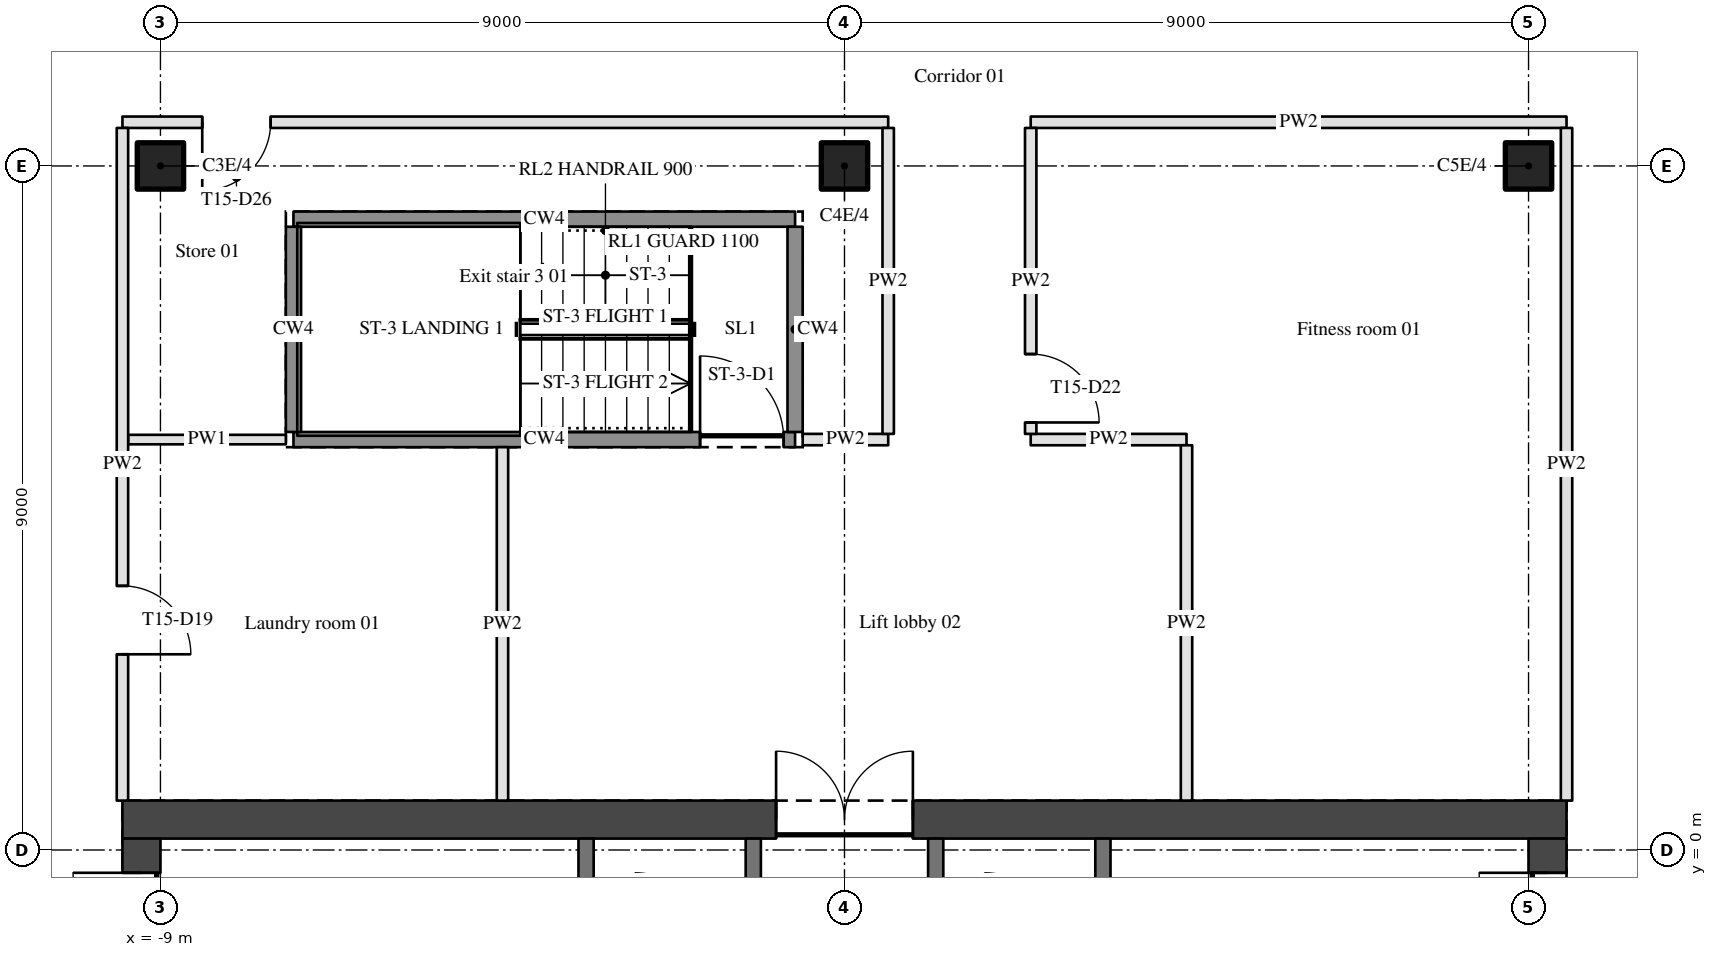
"""IFC4 building model, lengths in metres.
Left out: names, types, materials, properties, quantities, classifications, styles, units other than length and angle.
Written with IfcOpenShell. Run it as: python <this file> out.ifc"""

import sys

from ifc_helpers import new_model, si_unit, direction, frame, frame_2d, origin, origin_2d, place, context, subcontext, project, spatial, rectangle, hollow_circle, extrude, element, fill, save


model = new_model("IFC4")
c1 = context("Model", 3, precision=1e-05, world=origin(), true_north=direction((0.0, 1.0)))
c2 = subcontext(c1, "Body", "Model", "MODEL_VIEW")
j1 = project(units=[si_unit("LENGTHUNIT", "METRE"), si_unit("PLANEANGLEUNIT", "RADIAN")], contexts=[c1])
p1 = place(None, origin())
s1 = spatial("IfcSite", under=j1, at=p1, CompositionType="ELEMENT")
p2 = place(p1, origin())
s2 = spatial("IfcBuilding", under=s1, at=p2, CompositionType="ELEMENT")
p3 = place(p2, frame((0.0, 0.0, 206.85)))
s3 = spatial("IfcBuildingStorey", under=s2, at=p3, CompositionType="ELEMENT", Elevation=206.85)
for number, where, z_axis, x_axis in (
    (1, (-9.0, 9.0, 0.0), (0.0, 0.0, 1.0), (1.0, 0.0, 0.0)),
    (2, (0.0, 9.0, 0.0), (0.0, 0.0, 1.0), (1.0, 0.0, 0.0)),
    (3, (9.0, 9.0, 0.0), (0.0, 0.0, 1.0), (1.0, 0.0, 0.0)),
):
    element("IfcColumn", number, at=place(p3, frame(where, z_axis=z_axis, x_axis=x_axis)), inside=s3, PredefinedType="COLUMN", context=c2, shape_type="SweptSolid", body=[
        extrude(hollow_circle(Radius=0.305, WallThickness=0.03, at=origin_2d()), origin(), (0.0, 0.0, 1.0), 3.15),
    ])
p4 = place(p3, frame((-9.5, 0.4, 0.0), z_axis=(0.0, 0.0, 1.0), x_axis=(1.0, 0.0, 0.0)))
e4 = element("IfcWall", 4, at=p4, inside=s3, PredefinedType="SHEAR", context=c2, shape_type="SweptSolid", body=[
    extrude(rectangle(XDim=19.0, YDim=0.5, at=frame_2d((9.5, 0.0))), origin(), (0.0, 0.0, 1.0), 3.15),
])
p5 = place(p4, frame((8.6, 0.0, 0.0)))
e5 = element("IfcOpeningElement", 5, at=p5, cuts=e4, PredefinedType="OPENING", context=c2, shape_type="SweptSolid", body=[
    extrude(rectangle(XDim=1.8, YDim=2.1, at=frame_2d((0.9, 1.05))), frame((0.0, 0.26, 0.0), z_axis=(0.0, -1.0, 0.0), x_axis=(1.0, 0.0, 0.0)), (0.0, 0.0, 1.0), 0.52),
])
p6 = place(p3, frame((-9.25, -11.5, 0.0), z_axis=(0.0, 0.0, 1.0), x_axis=(0.0, 1.0, 0.0)))
e6 = element("IfcWall", 6, at=p6, inside=s3, PredefinedType="SHEAR", context=c2, shape_type="SweptSolid", body=[
    extrude(rectangle(XDim=11.65, YDim=0.5, at=frame_2d((5.825, 0.0))), origin(), (0.0, 0.0, 1.0), 3.15),
])
p7 = place(p6, frame((9.4, 0.0, 0.0)))
e7 = element("IfcOpeningElement", 7, at=p7, cuts=e6, PredefinedType="OPENING", context=c2, shape_type="SweptSolid", body=[
    extrude(rectangle(XDim=1.8, YDim=2.1, at=frame_2d((0.9, 1.05))), frame((0.0, 0.26, 0.0), z_axis=(0.0, -1.0, 0.0), x_axis=(1.0, 0.0, 0.0)), (0.0, 0.0, 1.0), 0.52),
])
p8 = place(p3, frame((9.25, -11.5, 0.0), z_axis=(0.0, 0.0, 1.0), x_axis=(0.0, 1.0, 0.0)))
e8 = element("IfcWall", 8, at=p8, inside=s3, PredefinedType="SHEAR", context=c2, shape_type="SweptSolid", body=[
    extrude(rectangle(XDim=11.65, YDim=0.5, at=frame_2d((5.825, 0.0))), origin(), (0.0, 0.0, 1.0), 3.15),
])
p9 = place(p8, frame((9.4, 0.0, 0.0)))
e9 = element("IfcOpeningElement", 9, at=p9, cuts=e8, PredefinedType="OPENING", context=c2, shape_type="SweptSolid", body=[
    extrude(rectangle(XDim=1.8, YDim=2.1, at=frame_2d((0.9, 1.05))), frame((0.0, 0.26, 0.0), z_axis=(0.0, -1.0, 0.0), x_axis=(1.0, 0.0, 0.0)), (0.0, 0.0, 1.0), 0.52),
])
p10 = place(p3, frame((-9.425, 5.4, 0.0), z_axis=(0.0, 0.0, 1.0), x_axis=(1.0, 0.0, 0.0)))
e10 = element("IfcWall", 10, at=p10, inside=s3, PredefinedType="PARTITIONING", context=c2, shape_type="SweptSolid", body=[
    extrude(rectangle(XDim=2.075, YDim=0.125, at=frame_2d((1.038, 0.0))), origin(), (0.0, 0.0, 1.0), 2.21),
])
p11 = place(p3, frame((-7.25, 5.4, 0.0), z_axis=(0.0, 0.0, 1.0), x_axis=(1.0, 0.0, 0.0)))
e11 = element("IfcWall", 11, at=p11, inside=s3, PredefinedType="SHEAR", context=c2, shape_type="SweptSolid", body=[
    extrude(rectangle(XDim=6.6, YDim=0.2, at=frame_2d((3.3, 0.0))), origin(), (0.0, 0.0, 1.0), 3.15),
])
p12 = place(p11, frame((5.35, 0.0, 0.0)))
e12 = element("IfcOpeningElement", 12, at=p12, cuts=e11, PredefinedType="OPENING", context=c2, shape_type="SweptSolid", body=[
    extrude(rectangle(XDim=1.1, YDim=2.1, at=frame_2d((0.55, 1.05))), frame((0.0, 0.11, 0.0), z_axis=(0.0, -1.0, 0.0), x_axis=(1.0, 0.0, 0.0)), (0.0, 0.0, 1.0), 0.22),
])
p13 = place(p3, frame((-0.55, 5.4, 0.0), z_axis=(0.0, 0.0, 1.0), x_axis=(1.0, 0.0, 0.0)))
e13 = element("IfcWall", 13, at=p13, inside=s3, PredefinedType="PARTITIONING", context=c2, shape_type="SweptSolid", body=[
    extrude(rectangle(XDim=1.125, YDim=0.15, at=frame_2d((0.562, 0.0))), origin(), (0.0, 0.0, 1.0), 2.21),
])
p14 = place(p3, frame((2.45, 5.4, 0.0), z_axis=(0.0, 0.0, 1.0), x_axis=(1.0, 0.0, 0.0)))
e14 = element("IfcWall", 14, at=p14, inside=s3, PredefinedType="PARTITIONING", context=c2, shape_type="SweptSolid", body=[
    extrude(rectangle(XDim=2.05, YDim=0.15, at=frame_2d((1.025, 0.0))), origin(), (0.0, 0.0, 1.0), 2.21),
])
p15 = place(p3, frame((-7.25, 8.3, 0.0), z_axis=(0.0, 0.0, 1.0), x_axis=(1.0, 0.0, 0.0)))
e15 = element("IfcWall", 15, at=p15, inside=s3, PredefinedType="SHEAR", context=c2, shape_type="SweptSolid", body=[
    extrude(rectangle(XDim=6.6, YDim=0.2, at=frame_2d((3.3, 0.0))), origin(), (0.0, 0.0, 1.0), 3.15),
])
p16 = place(p3, frame((0.575, 9.575, 0.0), z_axis=(0.0, 0.0, 1.0), x_axis=(-1.0, 0.0, 0.0)))
e16 = element("IfcWall", 16, at=p16, inside=s3, PredefinedType="PARTITIONING", context=c2, shape_type="SweptSolid", body=[
    extrude(rectangle(XDim=10.075, YDim=0.15, at=frame_2d((5.038, 0.0))), origin(), (0.0, 0.0, 1.0), 2.21),
])
p17 = place(p16, frame((8.125, 0.0, 0.0)))
e17 = element("IfcOpeningElement", 17, at=p17, cuts=e16, PredefinedType="OPENING", context=c2, shape_type="SweptSolid", body=[
    extrude(rectangle(XDim=0.9, YDim=2.1, at=frame_2d((0.45, 1.05))), frame((0.0, 0.085, 0.0), z_axis=(0.0, -1.0, 0.0), x_axis=(1.0, 0.0, 0.0)), (0.0, 0.0, 1.0), 0.17),
])
p18 = place(p3, frame((2.45, 9.575, 0.0), z_axis=(0.0, 0.0, 1.0), x_axis=(1.0, 0.0, 0.0)))
e18 = element("IfcWall", 18, at=p18, inside=s3, PredefinedType="PARTITIONING", context=c2, shape_type="SweptSolid", body=[
    extrude(rectangle(XDim=7.05, YDim=0.15, at=frame_2d((3.525, 0.0))), origin(), (0.0, 0.0, 1.0), 2.21),
])
p19 = place(p3, frame((-9.5, 9.5, 0.0), z_axis=(0.0, 0.0, 1.0), x_axis=(0.0, -1.0, 0.0)))
e19 = element("IfcWall", 19, at=p19, inside=s3, PredefinedType="PARTITIONING", context=c2, shape_type="SweptSolid", body=[
    extrude(rectangle(XDim=8.85, YDim=0.15, at=frame_2d((4.425, 0.0))), origin(), (0.0, 0.0, 1.0), 2.21),
])
p20 = place(p19, frame((6.025, 0.0, 0.0)))
e20 = element("IfcOpeningElement", 20, at=p20, cuts=e19, PredefinedType="OPENING", context=c2, shape_type="SweptSolid", body=[
    extrude(rectangle(XDim=0.9, YDim=2.1, at=frame_2d((0.45, 1.05))), frame((0.0, 0.085, 0.0), z_axis=(0.0, -1.0, 0.0), x_axis=(1.0, 0.0, 0.0)), (0.0, 0.0, 1.0), 0.17),
])
p21 = place(p3, frame((-7.25, 5.5, 0.0), z_axis=(0.0, 0.0, 1.0), x_axis=(0.0, 1.0, 0.0)))
e21 = element("IfcWall", 21, at=p21, inside=s3, PredefinedType="SHEAR", context=c2, shape_type="SweptSolid", body=[
    extrude(rectangle(XDim=2.7, YDim=0.2, at=frame_2d((1.35, 0.0))), origin(), (0.0, 0.0, 1.0), 3.15),
])
p22 = place(p3, frame((-4.5, 0.65, 0.0), z_axis=(0.0, 0.0, 1.0), x_axis=(0.0, 1.0, 0.0)))
e22 = element("IfcWall", 22, at=p22, inside=s3, PredefinedType="PARTITIONING", context=c2, shape_type="SweptSolid", body=[
    extrude(rectangle(XDim=4.65, YDim=0.15, at=frame_2d((2.325, 0.0))), origin(), (0.0, 0.0, 1.0), 2.21),
])
for number, where, z_axis, x_axis in (
    (23, (-3.4, -1.1, 0.0), (0.0, 0.0, 1.0), (0.0, 1.0, 0.0)),
    (24, (-1.2, -1.1, 0.0), (0.0, 0.0, 1.0), (0.0, 1.0, 0.0)),
):
    element("IfcWall", number, at=place(p3, frame(where, z_axis=z_axis, x_axis=x_axis)), inside=s3, PredefinedType="SOLIDWALL", context=c2, shape_type="SweptSolid", body=[
        extrude(rectangle(XDim=1.25, YDim=0.2, at=frame_2d((0.625, 0.0))), origin(), (0.0, 0.0, 1.0), 2.85),
    ])
p23 = place(p3, frame((-0.65, 5.5, 0.0), z_axis=(0.0, 0.0, 1.0), x_axis=(0.0, 1.0, 0.0)))
e25 = element("IfcWall", 25, at=p23, inside=s3, PredefinedType="SHEAR", context=c2, shape_type="SweptSolid", body=[
    extrude(rectangle(XDim=2.7, YDim=0.2, at=frame_2d((1.35, 0.0))), origin(), (0.0, 0.0, 1.0), 3.15),
])
p24 = place(p3, frame((0.575, 5.475, 0.0), z_axis=(0.0, 0.0, 1.0), x_axis=(0.0, 1.0, 0.0)))
e26 = element("IfcWall", 26, at=p24, inside=s3, PredefinedType="PARTITIONING", context=c2, shape_type="SweptSolid", body=[
    extrude(rectangle(XDim=4.025, YDim=0.15, at=frame_2d((2.012, 0.0))), origin(), (0.0, 0.0, 1.0), 2.21),
])
p25 = place(p3, frame((1.2, -1.1, 0.0), z_axis=(0.0, 0.0, 1.0), x_axis=(0.0, 1.0, 0.0)))
e27 = element("IfcWall", 27, at=p25, inside=s3, PredefinedType="SOLIDWALL", context=c2, shape_type="SweptSolid", body=[
    extrude(rectangle(XDim=1.25, YDim=0.2, at=frame_2d((0.625, 0.0))), origin(), (0.0, 0.0, 1.0), 2.85),
])
p26 = place(p3, frame((2.45, 9.5, 0.0), z_axis=(0.0, 0.0, 1.0), x_axis=(0.0, -1.0, 0.0)))
e28 = element("IfcWall", 28, at=p26, inside=s3, PredefinedType="PARTITIONING", context=c2, shape_type="SweptSolid", body=[
    extrude(rectangle(XDim=4.025, YDim=0.15, at=frame_2d((2.012, 0.0))), origin(), (0.0, 0.0, 1.0), 2.21),
])
p27 = place(p26, frame((2.975, 0.0, 0.0)))
e29 = element("IfcOpeningElement", 29, at=p27, cuts=e28, PredefinedType="OPENING", context=c2, shape_type="SweptSolid", body=[
    extrude(rectangle(XDim=0.9, YDim=2.1, at=frame_2d((0.45, 1.05))), frame((0.0, 0.085, 0.0), z_axis=(0.0, -1.0, 0.0), x_axis=(1.0, 0.0, 0.0)), (0.0, 0.0, 1.0), 0.17),
])
p28 = place(p3, frame((3.4, -1.1, 0.0), z_axis=(0.0, 0.0, 1.0), x_axis=(0.0, 1.0, 0.0)))
e30 = element("IfcWall", 30, at=p28, inside=s3, PredefinedType="SOLIDWALL", context=c2, shape_type="SweptSolid", body=[
    extrude(rectangle(XDim=1.25, YDim=0.2, at=frame_2d((0.625, 0.0))), origin(), (0.0, 0.0, 1.0), 2.85),
])
p29 = place(p3, frame((4.5, 0.65, 0.0), z_axis=(0.0, 0.0, 1.0), x_axis=(0.0, 1.0, 0.0)))
e31 = element("IfcWall", 31, at=p29, inside=s3, PredefinedType="PARTITIONING", context=c2, shape_type="SweptSolid", body=[
    extrude(rectangle(XDim=4.675, YDim=0.15, at=frame_2d((2.337, 0.0))), origin(), (0.0, 0.0, 1.0), 2.21),
])
p30 = place(p3, frame((9.5, 0.65, 0.0), z_axis=(0.0, 0.0, 1.0), x_axis=(0.0, 1.0, 0.0)))
e32 = element("IfcWall", 32, at=p30, inside=s3, PredefinedType="PARTITIONING", context=c2, shape_type="SweptSolid", body=[
    extrude(rectangle(XDim=8.85, YDim=0.15, at=frame_2d((4.425, 0.0))), origin(), (0.0, 0.0, 1.0), 2.21),
])
p31 = place(p7, origin())
e33 = element("IfcDoor", 33, at=p31, inside=s3, OperationType="DOUBLE_DOOR_SINGLE_SWING", PredefinedType="DOOR", context=c2, shape_type="SweptSolid", body=[
    extrude(rectangle(XDim=1.8, YDim=2.1, at=frame_2d((0.9, 1.05))), frame((0.0, 0.025, 0.0), z_axis=(0.0, -1.0, 0.0), x_axis=(1.0, 0.0, 0.0)), (0.0, 0.0, 1.0), 0.05),
])
fill(e7, e33)
p32 = place(p9, origin())
e34 = element("IfcDoor", 34, at=p32, inside=s3, OperationType="DOUBLE_DOOR_SINGLE_SWING", PredefinedType="DOOR", context=c2, shape_type="SweptSolid", body=[
    extrude(rectangle(XDim=1.8, YDim=2.1, at=frame_2d((0.9, 1.05))), frame((0.0, 0.025, 0.0), z_axis=(0.0, -1.0, 0.0), x_axis=(1.0, 0.0, 0.0)), (0.0, 0.0, 1.0), 0.05),
])
fill(e9, e34)
p33 = place(p5, origin())
e35 = element("IfcDoor", 35, at=p33, inside=s3, OperationType="DOUBLE_DOOR_SINGLE_SWING", PredefinedType="DOOR", context=c2, shape_type="SweptSolid", body=[
    extrude(rectangle(XDim=1.8, YDim=2.1, at=frame_2d((0.9, 1.05))), frame((0.0, 0.025, 0.0), z_axis=(0.0, -1.0, 0.0), x_axis=(1.0, 0.0, 0.0)), (0.0, 0.0, 1.0), 0.05),
])
fill(e5, e35)
p34 = place(p12, origin())
e36 = element("IfcDoor", 36, at=p34, inside=s3, OperationType="SINGLE_SWING_LEFT", PredefinedType="DOOR", context=c2, shape_type="SweptSolid", body=[
    extrude(rectangle(XDim=1.1, YDim=2.1, at=frame_2d((0.55, 1.05))), frame((0.0, 0.025, 0.0), z_axis=(0.0, -1.0, 0.0), x_axis=(1.0, 0.0, 0.0)), (0.0, 0.0, 1.0), 0.05),
])
fill(e12, e36)
p35 = place(p27, origin())
e37 = element("IfcDoor", 37, at=p35, inside=s3, OperationType="SINGLE_SWING_RIGHT", PredefinedType="DOOR", context=c2, shape_type="SweptSolid", body=[
    extrude(rectangle(XDim=0.9, YDim=2.1, at=frame_2d((0.45, 1.05))), frame((0.0, 0.025, 0.0), z_axis=(0.0, -1.0, 0.0), x_axis=(1.0, 0.0, 0.0)), (0.0, 0.0, 1.0), 0.05),
])
fill(e29, e37)
p36 = place(p17, origin())
e38 = element("IfcDoor", 38, at=p36, inside=s3, OperationType="SINGLE_SWING_RIGHT", PredefinedType="DOOR", context=c2, shape_type="SweptSolid", body=[
    extrude(rectangle(XDim=0.9, YDim=2.1, at=frame_2d((0.45, 1.05))), frame((0.0, 0.025, 0.0), z_axis=(0.0, -1.0, 0.0), x_axis=(1.0, 0.0, 0.0)), (0.0, 0.0, 1.0), 0.05),
])
fill(e17, e38)
p37 = place(p20, origin())
e39 = element("IfcDoor", 39, at=p37, inside=s3, OperationType="SINGLE_SWING_RIGHT", PredefinedType="DOOR", context=c2, shape_type="SweptSolid", body=[
    extrude(rectangle(XDim=0.9, YDim=2.1, at=frame_2d((0.45, 1.05))), frame((0.0, 0.025, 0.0), z_axis=(0.0, -1.0, 0.0), x_axis=(1.0, 0.0, 0.0)), (0.0, 0.0, 1.0), 0.05),
])
fill(e20, e39)
save(model, sys.argv[1])
